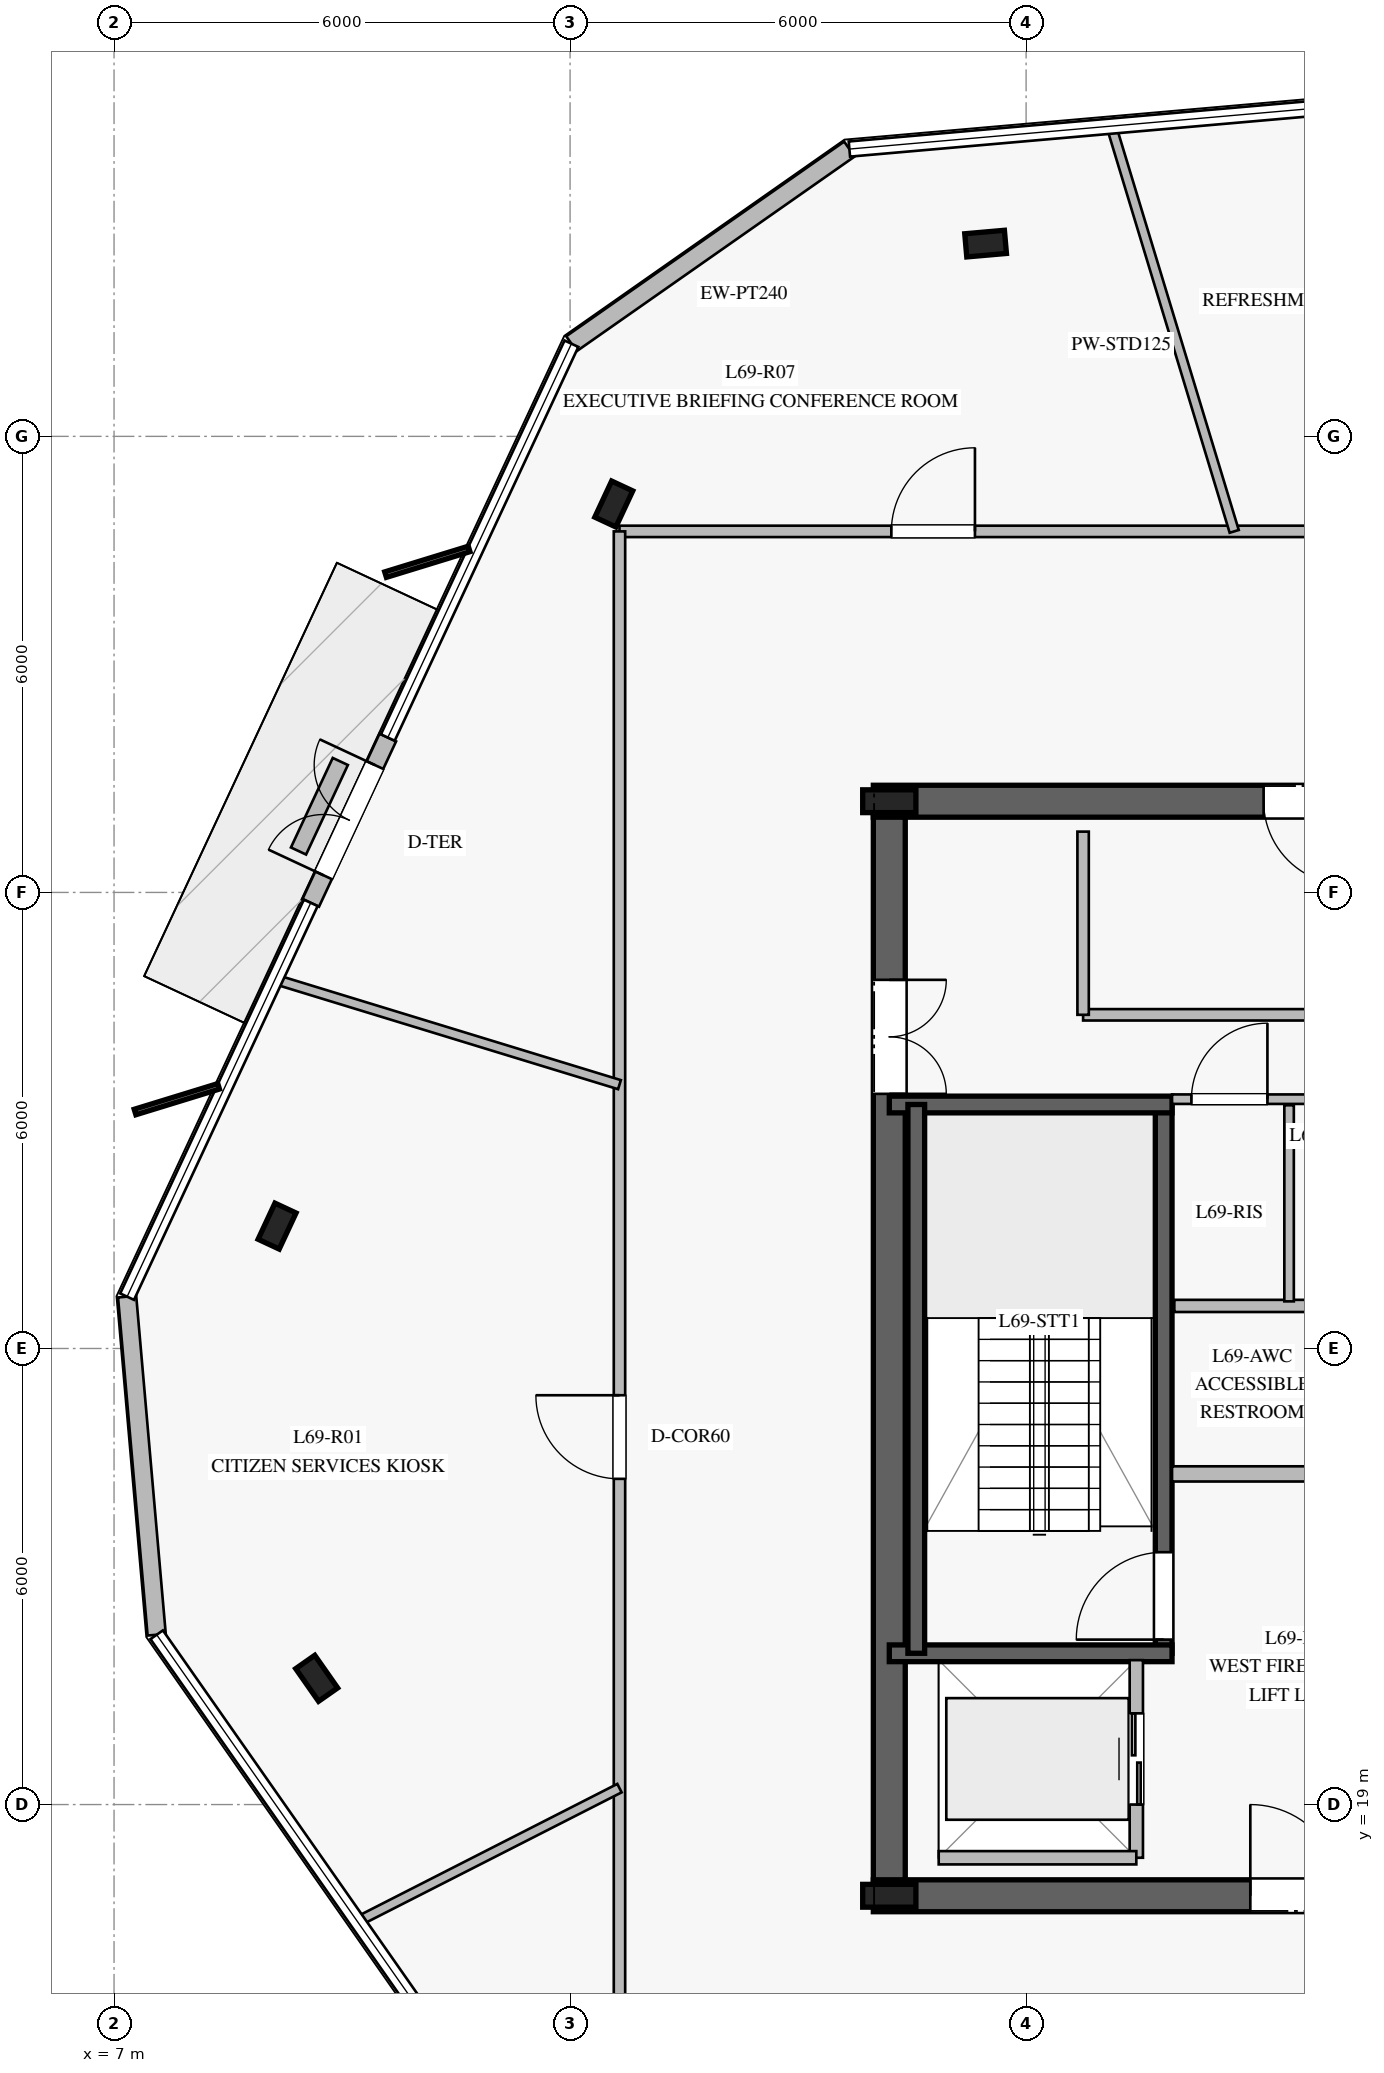
"""IFC4 building model, lengths in metres.
Left out: names, types, materials, properties, quantities, classifications, styles, units other than length and angle.
Written with IfcOpenShell. Run it as: python <this file> out.ifc"""

import sys

from ifc_helpers import new_model, si_unit, direction, frame, frame_2d, origin, origin_2d, place, context, subcontext, project, spatial, rectangle, i_section, extrude, element, fill, save


model = new_model("IFC4")
c1 = context("Model", 3, precision=1e-05, world=origin(), true_north=direction((0.0, 1.0)))
c2 = subcontext(c1, "Body", "Model", "MODEL_VIEW")
j1 = project(units=[si_unit("LENGTHUNIT", "METRE"), si_unit("PLANEANGLEUNIT", "RADIAN")], contexts=[c1])
p1 = place(None, origin())
s1 = spatial("IfcSite", under=j1, at=p1, CompositionType="ELEMENT")
p2 = place(p1, origin())
s2 = spatial("IfcBuilding", under=s1, at=p2, CompositionType="ELEMENT")
p3 = place(p2, frame((0.0, 0.0, 286.2)))
s3 = spatial("IfcBuildingStorey", under=s2, at=p3, CompositionType="ELEMENT", Elevation=286.2)
p4 = place(p3, frame((16.99, 17.8, 0.0), z_axis=(0.0, 0.0, 1.0), x_axis=(1.0, 0.0, 0.0)))
e1 = element("IfcWall", 1, at=p4, inside=s3, PredefinedType="SHEAR", context=c2, shape_type="SweptSolid", body=[
    extrude(rectangle(XDim=16.02, YDim=0.42, at=frame_2d((8.01, 0.0))), origin(), (0.0, 0.0, 1.0), 3.78),
])
p5 = place(p4, frame((4.96, 0.0, 0.0)))
e2 = element("IfcOpeningElement", 2, at=p5, cuts=e1, PredefinedType="OPENING", context=c2, shape_type="SweptSolid", body=[
    extrude(rectangle(XDim=1.2, YDim=2.25, at=frame_2d((0.6, 1.125))), frame((0.0, 0.22, 0.0), z_axis=(0.0, -1.0, 0.0), x_axis=(1.0, 0.0, 0.0)), (0.0, 0.0, 1.0), 0.44),
])
p6 = place(p4, frame((10.86, 0.0, 0.0)))
e3 = element("IfcOpeningElement", 3, at=p6, cuts=e1, PredefinedType="OPENING", context=c2, shape_type="SweptSolid", body=[
    extrude(rectangle(XDim=1.1, YDim=2.2, at=frame_2d((0.55, 1.1))), frame((0.0, 0.22, 0.0), z_axis=(0.0, -1.0, 0.0), x_axis=(1.0, 0.0, 0.0)), (0.0, 0.0, 1.0), 0.44),
])
p7 = place(p3, frame((33.01, 32.2, 0.0), z_axis=(0.0, 0.0, 1.0), x_axis=(-1.0, 0.0, 0.0)))
e4 = element("IfcWall", 4, at=p7, inside=s3, PredefinedType="SHEAR", context=c2, shape_type="SweptSolid", body=[
    extrude(rectangle(XDim=16.02, YDim=0.42, at=frame_2d((8.01, 0.0))), origin(), (0.0, 0.0, 1.0), 3.78),
])
p8 = place(p7, frame((4.96, 0.0, 0.0)))
e5 = element("IfcOpeningElement", 5, at=p8, cuts=e4, PredefinedType="OPENING", context=c2, shape_type="SweptSolid", body=[
    extrude(rectangle(XDim=1.2, YDim=2.25, at=frame_2d((0.6, 1.125))), frame((0.0, 0.22, 0.0), z_axis=(0.0, -1.0, 0.0), x_axis=(1.0, 0.0, 0.0)), (0.0, 0.0, 1.0), 0.44),
])
p9 = place(p7, frame((9.785, 0.0, 0.0)))
e6 = element("IfcOpeningElement", 6, at=p9, cuts=e4, PredefinedType="OPENING", context=c2, shape_type="SweptSolid", body=[
    extrude(rectangle(XDim=1.1, YDim=2.2, at=frame_2d((0.55, 1.1))), frame((0.0, 0.22, 0.0), z_axis=(0.0, -1.0, 0.0), x_axis=(1.0, 0.0, 0.0)), (0.0, 0.0, 1.0), 0.44),
])
p10 = place(p3, frame((17.2, 31.99, 0.0), z_axis=(0.0, 0.0, 1.0), x_axis=(0.0, -1.0, 0.0)))
e7 = element("IfcWall", 7, at=p10, inside=s3, PredefinedType="SHEAR", context=c2, shape_type="SweptSolid", body=[
    extrude(rectangle(XDim=13.98, YDim=0.42, at=frame_2d((6.99, 0.0))), origin(), (0.0, 0.0, 1.0), 3.78),
])
p11 = place(p10, frame((2.14, 0.0, 0.0)))
e8 = element("IfcOpeningElement", 8, at=p11, cuts=e7, PredefinedType="OPENING", context=c2, shape_type="SweptSolid", body=[
    extrude(rectangle(XDim=1.5, YDim=2.2, at=frame_2d((0.75, 1.1))), frame((0.0, 0.22, 0.0), z_axis=(0.0, -1.0, 0.0), x_axis=(1.0, 0.0, 0.0)), (0.0, 0.0, 1.0), 0.44),
])
for number, where, z_axis, x_axis in (
    (9, (17.2, 17.8, 0.0), (0.0, 0.0, 1.0), (1.0, 0.0, 0.0)),
    (10, (17.2, 32.2, 0.0), (0.0, 0.0, 1.0), (1.0, 0.0, 0.0)),
):
    element("IfcColumn", number, at=place(p3, frame(where, z_axis=z_axis, x_axis=x_axis)), inside=s3, PredefinedType="COLUMN", context=c2, shape_type="SweptSolid", body=[
        extrude(i_section(OverallWidth=0.3, OverallDepth=0.7, WebThickness=0.017, FlangeThickness=0.032, at=origin_2d()), origin(), (0.0, 0.0, 1.0), 4.0),
    ])
p12 = place(p3, frame((20.81, 20.99, 0.0), z_axis=(0.0, 0.0, 1.0), x_axis=(0.0, 1.0, 0.0)))
e11 = element("IfcWall", 11, at=p12, inside=s3, PredefinedType="SOLIDWALL", context=c2, shape_type="SweptSolid", body=[
    extrude(rectangle(XDim=7.22, YDim=0.22, at=frame_2d((3.61, 0.0))), origin(), (0.0, 0.0, 1.0), 3.78),
])
p13 = place(p12, frame((0.18, 0.0, 0.0)))
e12 = element("IfcOpeningElement", 12, at=p13, cuts=e11, PredefinedType="OPENING", context=c2, shape_type="SweptSolid", body=[
    extrude(rectangle(XDim=1.15, YDim=2.2, at=frame_2d((0.575, 1.1))), frame((0.0, 0.12, 0.0), z_axis=(0.0, -1.0, 0.0), x_axis=(1.0, 0.0, 0.0)), (0.0, 0.0, 1.0), 0.24),
])
for number, where, z_axis, x_axis in (
    (13, (17.2, 20.99, 0.0), (0.0, 0.0, 1.0), (1.0, 0.0, 0.0)),
    (14, (17.2, 28.21, 0.0), (0.0, 0.0, 1.0), (1.0, 0.0, 0.0)),
):
    element("IfcWall", number, at=place(p3, frame(where, z_axis=z_axis, x_axis=x_axis)), inside=s3, PredefinedType="SOLIDWALL", context=c2, shape_type="SweptSolid", body=[
        extrude(rectangle(XDim=3.72, YDim=0.22, at=frame_2d((1.86, 0.0))), origin(), (0.0, 0.0, 1.0), 3.78),
    ])
p14 = place(p3, frame((17.555, 28.21, 0.0), z_axis=(0.0, 0.0, 1.0), x_axis=(0.0, -1.0, 0.0)))
e15 = element("IfcWall", 15, at=p14, inside=s3, PredefinedType="SOLIDWALL", context=c2, shape_type="SweptSolid", body=[
    extrude(rectangle(XDim=7.22, YDim=0.22, at=frame_2d((3.61, 0.0))), origin(), (0.0, 0.0, 1.0), 3.78),
])
for number, where, z_axis, x_axis in (
    (16, (18.467, 39.536, 0.0), (0.0, 0.0, 1.0), (0.996, 0.087, 0.0)),
    (17, (13.575, 36.11, 0.0), (0.0, 0.0, 1.0), (0.423, 0.906, 0.0)),
    (18, (9.145, 26.61, 0.0), (0.0, 0.0, 1.0), (0.423, 0.906, 0.0)),
    (19, (9.666, 20.661, 0.0), (0.0, 0.0, 1.0), (-0.574, 0.819, 0.0)),
):
    element("IfcColumn", number, at=place(p3, frame(where, z_axis=z_axis, x_axis=x_axis)), inside=s3, PredefinedType="COLUMN", context=c2, shape_type="SweptSolid", body=[
        extrude(i_section(OverallWidth=0.306, OverallDepth=0.524, WebThickness=0.021, FlangeThickness=0.04, at=origin_2d()), origin(), (0.0, 0.0, 1.0), 4.0),
    ])
p15 = place(p3, frame((16.675, 40.78, 0.0), z_axis=(0.0, 0.0, 1.0), x_axis=(-0.819111157222, -0.573634824705, 0.0)))
e20 = element("IfcWall", 20, at=p15, inside=s3, PredefinedType="STANDARD", context=c2, shape_type="SweptSolid", body=[
    extrude(rectangle(XDim=4.465, YDim=0.24, at=frame_2d((2.232, 0.0))), origin(), (0.0, 0.0, 1.0), 3.78),
])
p16 = place(p3, frame((10.602, 33.038, 0.0), z_axis=(0.0, 0.0, 1.0), x_axis=(-0.422590274694, -0.906320837085, 0.0)))
e21 = element("IfcWall", 21, at=p16, inside=s3, PredefinedType="STANDARD", context=c2, shape_type="SweptSolid", body=[
    extrude(rectangle(XDim=2.4, YDim=0.24, at=frame_2d((1.2, 0.0))), origin(), (0.0, 0.0, 1.0), 3.78),
])
p17 = place(p16, frame((0.4, 0.0, 0.0)))
e22 = element("IfcOpeningElement", 22, at=p17, cuts=e21, PredefinedType="OPENING", context=c2, shape_type="SweptSolid", body=[
    extrude(rectangle(XDim=1.6, YDim=2.25, at=frame_2d((0.8, 1.125))), frame((0.0, 0.13, 0.0), z_axis=(0.0, -1.0, 0.0), x_axis=(1.0, 0.0, 0.0)), (0.0, 0.0, 1.0), 0.26),
])
p18 = place(p3, frame((7.172, 25.682, 0.0), z_axis=(0.0, 0.0, 1.0), x_axis=(0.087103868575, -0.996199235133, 0.0)))
e23 = element("IfcWall", 23, at=p18, inside=s3, PredefinedType="STANDARD", context=c2, shape_type="SweptSolid", body=[
    extrude(rectangle(XDim=4.465, YDim=0.24, at=frame_2d((2.232, 0.0))), origin(), (0.0, 0.0, 1.0), 3.78),
])
p19 = place(p3, frame((9.977, 32.723, 0.0), z_axis=(0.0, 0.0, 1.0), x_axis=(-0.423091064029, -0.90608716553, 0.0)))
e24 = element("IfcWall", 24, at=p19, inside=s3, PredefinedType="USERDEFINED", context=c2, shape_type="SweptSolid", body=[
    extrude(rectangle(XDim=1.3, YDim=0.22, at=frame_2d((0.65, 0.0))), origin(), (0.0, 0.0, 1.0), 0.4),
])
p20 = place(p3, frame((20.92, 23.35, 0.0), z_axis=(0.0, 0.0, 1.0), x_axis=(1.0, 0.0, 0.0)))
e25 = element("IfcWall", 25, at=p20, inside=s3, PredefinedType="PARTITIONING", context=c2, shape_type="SweptSolid", body=[
    extrude(rectangle(XDim=3.38, YDim=0.2, at=frame_2d((1.69, 0.0))), origin(), (0.0, 0.0, 1.0), 3.78),
])
p21 = place(p3, frame((20.92, 28.28, 0.0), z_axis=(0.0, 0.0, 1.0), x_axis=(1.0, 0.0, 0.0)))
e26 = element("IfcWall", 26, at=p21, inside=s3, PredefinedType="PARTITIONING", context=c2, shape_type="SweptSolid", body=[
    extrude(rectangle(XDim=3.405, YDim=0.125, at=frame_2d((1.703, 0.0))), origin(), (0.0, 0.0, 1.0), 3.78),
])
p22 = place(p21, frame((0.255, 0.0, 0.0)))
e27 = element("IfcOpeningElement", 27, at=p22, cuts=e26, PredefinedType="OPENING", context=c2, shape_type="SweptSolid", body=[
    extrude(rectangle(XDim=1.0, YDim=2.15, at=frame_2d((0.5, 1.075))), frame((0.0, 0.073, 0.0), z_axis=(0.0, -1.0, 0.0), x_axis=(1.0, 0.0, 0.0)), (0.0, 0.0, 1.0), 0.145),
])
p23 = place(p3, frame((20.95, 25.56, 0.0), z_axis=(0.0, 0.0, 1.0), x_axis=(1.0, 0.0, 0.0)))
e28 = element("IfcWall", 28, at=p23, inside=s3, PredefinedType="PLUMBINGWALL", context=c2, shape_type="SweptSolid", body=[
    extrude(rectangle(XDim=3.3, YDim=0.16, at=frame_2d((1.65, 0.0))), origin(), (0.0, 0.0, 1.0), 3.78),
])
p24 = place(p3, frame((22.46, 25.62, 0.0), z_axis=(0.0, 0.0, 1.0), x_axis=(0.0, 1.0, 0.0)))
e29 = element("IfcWall", 29, at=p24, inside=s3, PredefinedType="PARTITIONING", context=c2, shape_type="SweptSolid", body=[
    extrude(rectangle(XDim=2.58, YDim=0.125, at=frame_2d((1.29, 0.0))), origin(), (0.0, 0.0, 1.0), 3.78),
])
p25 = place(p3, frame((19.75, 29.39, 0.0), z_axis=(0.0, 0.0, 1.0), x_axis=(1.0, 0.0, 0.0)))
e30 = element("IfcWall", 30, at=p25, inside=s3, PredefinedType="PARTITIONING", context=c2, shape_type="SweptSolid", body=[
    extrude(rectangle(XDim=5.9, YDim=0.15, at=frame_2d((2.95, 0.0))), origin(), (0.0, 0.0, 1.0), 3.78),
])
p26 = place(p3, frame((19.75, 29.39, 0.0), z_axis=(0.0, 0.0, 1.0), x_axis=(0.0, 1.0, 0.0)))
e31 = element("IfcWall", 31, at=p26, inside=s3, PredefinedType="PARTITIONING", context=c2, shape_type="SweptSolid", body=[
    extrude(rectangle(XDim=2.41, YDim=0.15, at=frame_2d((1.205, 0.0))), origin(), (0.0, 0.0, 1.0), 3.78),
])
p27 = place(p3, frame((20.45, 18.3, 0.0), z_axis=(0.0, 0.0, 1.0), x_axis=(0.0, 1.0, 0.0)))
e32 = element("IfcWall", 32, at=p27, inside=s3, PredefinedType="PARTITIONING", context=c2, shape_type="SweptSolid", body=[
    extrude(rectangle(XDim=2.6, YDim=0.175, at=frame_2d((1.3, 0.0))), origin(), (0.0, 0.0, 1.0), 3.78),
])
p28 = place(p27, frame((0.7, 0.0, 0.0)))
e33 = element("IfcOpeningElement", 33, at=p28, cuts=e32, PredefinedType="OPENING", context=c2, shape_type="SweptSolid", body=[
    extrude(rectangle(XDim=1.2, YDim=2.2, at=frame_2d((0.6, 1.1))), frame((0.0, 0.098, 0.0), z_axis=(0.0, -1.0, 0.0), x_axis=(1.0, 0.0, 0.0)), (0.0, 0.0, 1.0), 0.195),
])
p29 = place(p3, frame((17.85, 18.3, 0.0), z_axis=(0.0, 0.0, 1.0), x_axis=(1.0, 0.0, 0.0)))
e34 = element("IfcWall", 34, at=p29, inside=s3, PredefinedType="PARTITIONING", context=c2, shape_type="SweptSolid", body=[
    extrude(rectangle(XDim=2.6, YDim=0.175, at=frame_2d((1.3, 0.0))), origin(), (0.0, 0.0, 1.0), 3.78),
])
p30 = place(p3, frame((13.65, 35.75, 0.0), z_axis=(0.0, 0.0, 1.0), x_axis=(1.0, 0.0, 0.0)))
e35 = element("IfcWall", 35, at=p30, inside=s3, PredefinedType="PARTITIONING", context=c2, shape_type="SweptSolid", body=[
    extrude(rectangle(XDim=22.7, YDim=0.15, at=frame_2d((11.35, 0.0))), origin(), (0.0, 0.0, 1.0), 3.05),
])
p31 = place(p30, frame((18.03, 0.0, 0.0)))
e36 = element("IfcOpeningElement", 36, at=p31, cuts=e35, PredefinedType="OPENING", context=c2, shape_type="SweptSolid", body=[
    extrude(rectangle(XDim=1.1, YDim=2.2, at=frame_2d((0.55, 1.1))), frame((0.0, 0.085, 0.0), z_axis=(0.0, -1.0, 0.0), x_axis=(1.0, 0.0, 0.0)), (0.0, 0.0, 1.0), 0.17),
])
p32 = place(p30, frame((10.897, 0.0, 0.0)))
e37 = element("IfcOpeningElement", 37, at=p32, cuts=e35, PredefinedType="OPENING", context=c2, shape_type="SweptSolid", body=[
    extrude(rectangle(XDim=1.1, YDim=2.2, at=frame_2d((0.55, 1.1))), frame((0.0, 0.085, 0.0), z_axis=(0.0, -1.0, 0.0), x_axis=(1.0, 0.0, 0.0)), (0.0, 0.0, 1.0), 0.17),
])
p33 = place(p30, frame((3.577, 0.0, 0.0)))
e38 = element("IfcOpeningElement", 38, at=p33, cuts=e35, PredefinedType="OPENING", context=c2, shape_type="SweptSolid", body=[
    extrude(rectangle(XDim=1.1, YDim=2.2, at=frame_2d((0.55, 1.1))), frame((0.0, 0.085, 0.0), z_axis=(0.0, -1.0, 0.0), x_axis=(1.0, 0.0, 0.0)), (0.0, 0.0, 1.0), 0.17),
])
p34 = place(p3, frame((13.65, 14.25, 0.0), z_axis=(0.0, 0.0, 1.0), x_axis=(0.0, 1.0, 0.0)))
e39 = element("IfcWall", 39, at=p34, inside=s3, PredefinedType="PARTITIONING", context=c2, shape_type="SweptSolid", body=[
    extrude(rectangle(XDim=21.5, YDim=0.15, at=frame_2d((10.75, 0.0))), origin(), (0.0, 0.0, 1.0), 3.28),
])
p35 = place(p34, frame((9.035, 0.0, 0.0)))
e40 = element("IfcOpeningElement", 40, at=p35, cuts=e39, PredefinedType="OPENING", context=c2, shape_type="SweptSolid", body=[
    extrude(rectangle(XDim=1.1, YDim=2.2, at=frame_2d((0.55, 1.1))), frame((0.0, 0.085, 0.0), z_axis=(0.0, -1.0, 0.0), x_axis=(1.0, 0.0, 0.0)), (0.0, 0.0, 1.0), 0.17),
])
p36 = place(p3, frame((21.738, 35.75, 0.0), z_axis=(0.0, 0.0, 1.0), x_axis=(-0.290201338229, 0.956965612387, 0.0)))
e41 = element("IfcWall", 41, at=p36, inside=s3, PredefinedType="PARTITIONING", context=c2, shape_type="SweptSolid", body=[
    extrude(rectangle(XDim=5.555, YDim=0.125, at=frame_2d((2.777, 0.0))), origin(), (0.0, 0.0, 1.0), 3.28),
])
p37 = place(p3, frame((13.65, 28.471, 0.0), z_axis=(0.0, 0.0, 1.0), x_axis=(-0.95627729349, 0.292461515342, 0.0)))
e42 = element("IfcWall", 42, at=p37, inside=s3, PredefinedType="PARTITIONING", context=c2, shape_type="SweptSolid", body=[
    extrude(rectangle(XDim=4.722, YDim=0.125, at=frame_2d((2.361, 0.0))), origin(), (0.0, 0.0, 1.0), 3.28),
])
p38 = place(p3, frame((13.65, 19.216, 0.0), z_axis=(0.0, 0.0, 1.0), x_axis=(-0.891017734347, -0.453968497892, 0.0)))
e43 = element("IfcWall", 43, at=p38, inside=s3, PredefinedType="PARTITIONING", context=c2, shape_type="SweptSolid", body=[
    extrude(rectangle(XDim=3.853, YDim=0.125, at=frame_2d((1.926, 0.0))), origin(), (0.0, 0.0, 1.0), 3.28),
])
p39 = place(p17, frame((1.6, 0.0, 0.0), z_axis=(0.0, 0.0, 1.0), x_axis=(-1.0, 0.0, 0.0)))
e44 = element("IfcDoor", 44, at=p39, inside=s3, OperationType="DOUBLE_DOOR_SINGLE_SWING", PredefinedType="DOOR", context=c2, shape_type="SweptSolid", body=[
    extrude(rectangle(XDim=1.6, YDim=2.25, at=frame_2d((0.8, 1.125))), frame((0.0, 0.025, 0.0), z_axis=(0.0, -1.0, 0.0), x_axis=(1.0, 0.0, 0.0)), (0.0, 0.0, 1.0), 0.05),
])
fill(e22, e44)
p40 = place(p13, origin())
e45 = element("IfcDoor", 45, at=p40, inside=s3, OperationType="SINGLE_SWING_LEFT", PredefinedType="DOOR", context=c2, shape_type="SweptSolid", body=[
    extrude(rectangle(XDim=1.15, YDim=2.2, at=frame_2d((0.575, 1.1))), frame((0.0, 0.025, 0.0), z_axis=(0.0, -1.0, 0.0), x_axis=(1.0, 0.0, 0.0)), (0.0, 0.0, 1.0), 0.05),
])
fill(e12, e45)
p41 = place(p5, origin())
e46 = element("IfcDoor", 46, at=p41, inside=s3, OperationType="SINGLE_SWING_LEFT", PredefinedType="DOOR", context=c2, shape_type="SweptSolid", body=[
    extrude(rectangle(XDim=1.2, YDim=2.25, at=frame_2d((0.6, 1.125))), frame((0.0, 0.025, 0.0), z_axis=(0.0, -1.0, 0.0), x_axis=(1.0, 0.0, 0.0)), (0.0, 0.0, 1.0), 0.05),
])
fill(e2, e46)
p42 = place(p11, origin())
e47 = element("IfcDoor", 47, at=p42, inside=s3, OperationType="DOUBLE_DOOR_SINGLE_SWING", PredefinedType="DOOR", context=c2, shape_type="SweptSolid", body=[
    extrude(rectangle(XDim=1.5, YDim=2.2, at=frame_2d((0.75, 1.1))), frame((0.0, 0.025, 0.0), z_axis=(0.0, -1.0, 0.0), x_axis=(1.0, 0.0, 0.0)), (0.0, 0.0, 1.0), 0.05),
])
fill(e8, e47)
p43 = place(p22, origin())
e48 = element("IfcDoor", 48, at=p43, inside=s3, OperationType="SINGLE_SWING_RIGHT", PredefinedType="DOOR", context=c2, shape_type="SweptSolid", body=[
    extrude(rectangle(XDim=1.0, YDim=2.15, at=frame_2d((0.5, 1.075))), frame((0.0, 0.025, 0.0), z_axis=(0.0, -1.0, 0.0), x_axis=(1.0, 0.0, 0.0)), (0.0, 0.0, 1.0), 0.05),
])
fill(e27, e48)
p44 = place(p9, origin())
e49 = element("IfcDoor", 49, at=p44, inside=s3, OperationType="SINGLE_SWING_LEFT", PredefinedType="DOOR", context=c2, shape_type="SweptSolid", body=[
    extrude(rectangle(XDim=1.1, YDim=2.2, at=frame_2d((0.55, 1.1))), frame((0.0, 0.025, 0.0), z_axis=(0.0, -1.0, 0.0), x_axis=(1.0, 0.0, 0.0)), (0.0, 0.0, 1.0), 0.05),
])
fill(e6, e49)
p45 = place(p28, origin())
e50 = element("IfcDoor", 50, at=p45, inside=s3, OperationType="DOUBLE_DOOR_SLIDING", PredefinedType="DOOR", context=c2, shape_type="SweptSolid", body=[
    extrude(rectangle(XDim=1.2, YDim=2.2, at=frame_2d((0.6, 1.1))), frame((0.0, 0.025, 0.0), z_axis=(0.0, -1.0, 0.0), x_axis=(1.0, 0.0, 0.0)), (0.0, 0.0, 1.0), 0.05),
])
fill(e33, e50)
p46 = place(p35, origin())
e51 = element("IfcDoor", 51, at=p46, inside=s3, OperationType="SINGLE_SWING_RIGHT", PredefinedType="DOOR", context=c2, shape_type="SweptSolid", body=[
    extrude(rectangle(XDim=1.1, YDim=2.2, at=frame_2d((0.55, 1.1))), frame((0.0, 0.025, 0.0), z_axis=(0.0, -1.0, 0.0), x_axis=(1.0, 0.0, 0.0)), (0.0, 0.0, 1.0), 0.05),
])
fill(e40, e51)
p47 = place(p33, origin())
e52 = element("IfcDoor", 52, at=p47, inside=s3, OperationType="SINGLE_SWING_RIGHT", PredefinedType="DOOR", context=c2, shape_type="SweptSolid", body=[
    extrude(rectangle(XDim=1.1, YDim=2.2, at=frame_2d((0.55, 1.1))), frame((0.0, 0.025, 0.0), z_axis=(0.0, -1.0, 0.0), x_axis=(1.0, 0.0, 0.0)), (0.0, 0.0, 1.0), 0.05),
])
fill(e38, e52)
save(model, sys.argv[1])
